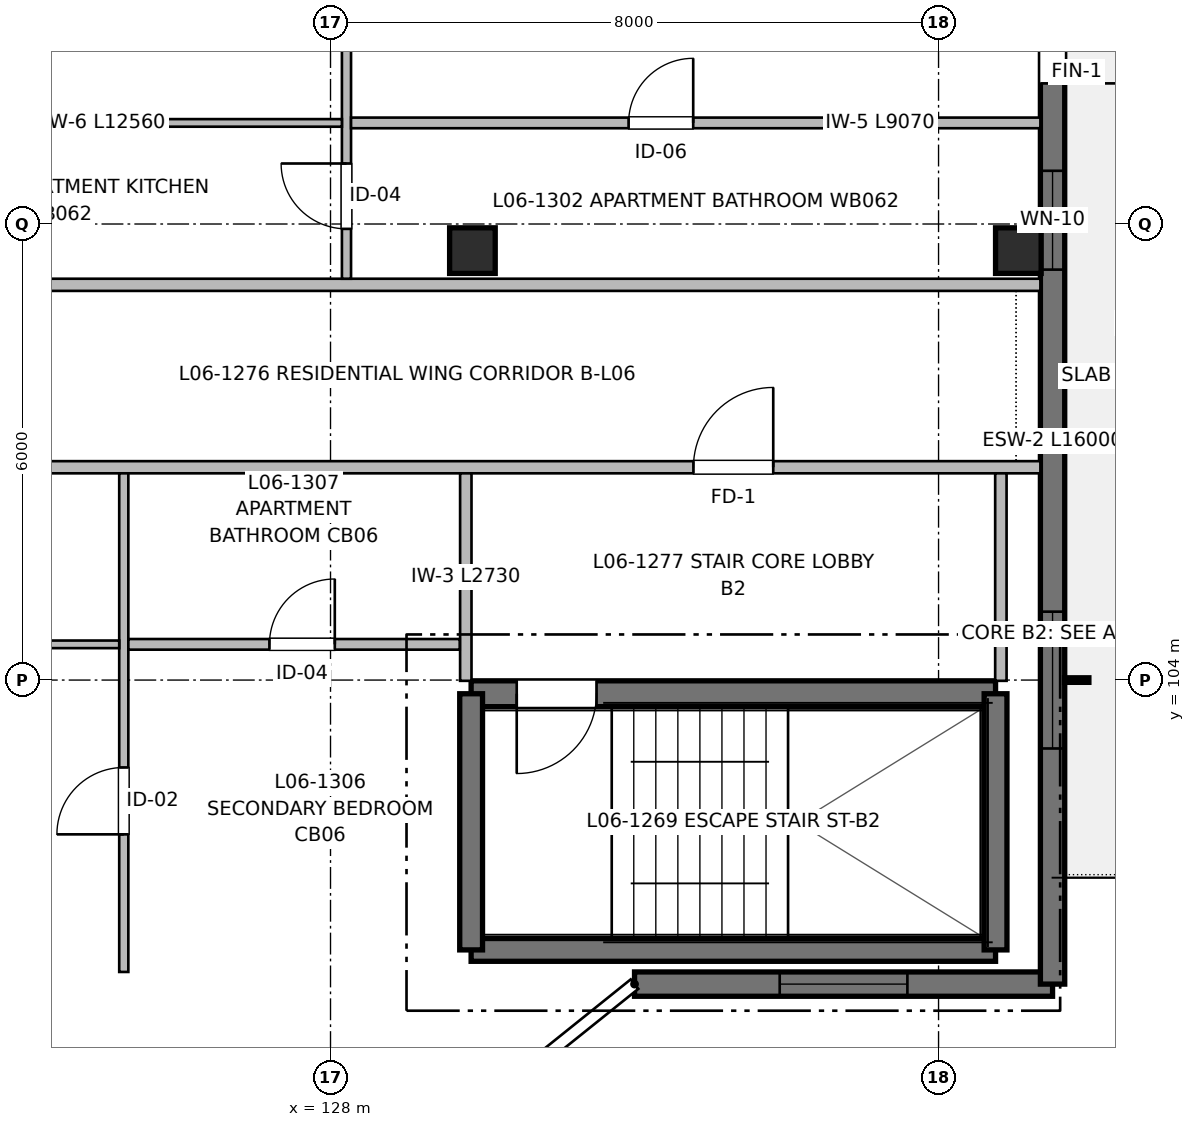
"""IFC4 building model, lengths in metres.
Left out: names, types, materials, properties, quantities, classifications, styles, units other than length and angle.
Written with IfcOpenShell. Run it as: python <this file> out.ifc"""

import sys

from ifc_helpers import new_model, si_unit, direction, frame, frame_2d, origin, origin_2d, place, context, subcontext, project, spatial, rectangle, extrude, element, fill, save


model = new_model("IFC4")
c1 = context("Model", 3, precision=1e-05, world=origin(), true_north=direction((0.0, 1.0)))
c2 = subcontext(c1, "Body", "Model", "MODEL_VIEW")
j1 = project(units=[si_unit("LENGTHUNIT", "METRE"), si_unit("PLANEANGLEUNIT", "RADIAN")], contexts=[c1])
p1 = place(None, origin())
s1 = spatial("IfcSite", under=j1, at=p1, CompositionType="ELEMENT")
p2 = place(p1, origin())
s2 = spatial("IfcBuilding", under=s1, at=p2, CompositionType="ELEMENT")
p3 = place(p2, frame((0.0, 0.0, 20.16)))
s3 = spatial("IfcBuildingStorey", under=s2, at=p3, CompositionType="ELEMENT", Elevation=20.16)
for number, where, z_axis, x_axis in (
    (1, (129.867, 109.65, 0.0), (0.0, 0.0, 1.0), (1.0, 0.0, 0.0)),
    (2, (137.05, 109.65, 0.0), (0.0, 0.0, 1.0), (1.0, 0.0, 0.0)),
):
    element("IfcColumn", number, at=place(p3, frame(where, z_axis=z_axis, x_axis=x_axis)), inside=s3, PredefinedType="COLUMN", context=c2, shape_type="SweptSolid", body=[
        extrude(rectangle(XDim=0.6, YDim=0.6, at=origin_2d()), origin(), (0.0, 0.0, 1.0), 3.2),
    ])
p4 = place(p3, frame((129.85, 100.45, 0.0), z_axis=(0.0, 0.0, 1.0), x_axis=(1.0, 0.0, 0.0)))
e3 = element("IfcWall", 3, at=p4, inside=s3, PredefinedType="SHEAR", context=c2, shape_type="SweptSolid", body=[
    extrude(rectangle(XDim=6.9, YDim=0.3, at=frame_2d((3.45, 0.0))), origin(), (0.0, 0.0, 1.0), 3.2),
])
p5 = place(p3, frame((136.75, 103.82, 0.0), z_axis=(0.0, 0.0, 1.0), x_axis=(-1.0, 0.0, 0.0)))
e4 = element("IfcWall", 4, at=p5, inside=s3, PredefinedType="SHEAR", context=c2, shape_type="SweptSolid", body=[
    extrude(rectangle(XDim=6.9, YDim=0.34, at=frame_2d((3.45, 0.0))), origin(), (0.0, 0.0, 1.0), 3.2),
])
p6 = place(p5, frame((5.25, 0.0, 0.0)))
e5 = element("IfcOpeningElement", 5, at=p6, cuts=e4, PredefinedType="OPENING", context=c2, shape_type="SweptSolid", body=[
    extrude(rectangle(XDim=1.05, YDim=2.15, at=frame_2d((0.525, 1.075))), frame((0.0, 0.18, 0.0), z_axis=(0.0, -1.0, 0.0), x_axis=(1.0, 0.0, 0.0)), (0.0, 0.0, 1.0), 0.36),
])
for number, where, z_axis, x_axis in (
    (6, (129.85, 103.82, 0.0), (0.0, 0.0, 1.0), (0.0, -1.0, 0.0)),
    (7, (136.75, 100.45, 0.0), (0.0, 0.0, 1.0), (0.0, 1.0, 0.0)),
):
    element("IfcWall", number, at=place(p3, frame(where, z_axis=z_axis, x_axis=x_axis)), inside=s3, PredefinedType="SHEAR", context=c2, shape_type="SweptSolid", body=[
        extrude(rectangle(XDim=3.37, YDim=0.3, at=frame_2d((1.685, 0.0))), origin(), (0.0, 0.0, 1.0), 3.2),
    ])
p7 = place(p3, frame((137.5, 100.0, 0.0), z_axis=(0.0, 0.0, 1.0), x_axis=(-1.0, 0.0, 0.0)))
e8 = element("IfcWall", 8, at=p7, inside=s3, PredefinedType="SHEAR", context=c2, shape_type="SweptSolid", body=[
    extrude(rectangle(XDim=5.5, YDim=0.32, at=frame_2d((2.75, 0.0))), origin(), (0.0, 0.0, 1.0), 2.98),
])
p8 = place(p7, frame((1.91, 0.0, 0.72)))
e9 = element("IfcOpeningElement", 9, at=p8, cuts=e8, PredefinedType="OPENING", context=c2, shape_type="SweptSolid", body=[
    extrude(rectangle(XDim=1.68, YDim=1.5, at=frame_2d((0.84, 0.75))), frame((0.0, 0.17, 0.0), z_axis=(0.0, -1.0, 0.0), x_axis=(1.0, 0.0, 0.0)), (0.0, 0.0, 1.0), 0.34),
])
p9 = place(p3, frame((137.5, 116.0, 0.0), z_axis=(0.0, 0.0, 1.0), x_axis=(0.0, -1.0, 0.0)))
e10 = element("IfcWall", 10, at=p9, inside=s3, PredefinedType="SHEAR", context=c2, shape_type="SweptSolid", body=[
    extrude(rectangle(XDim=16.0, YDim=0.32, at=frame_2d((8.0, 0.0))), origin(), (0.0, 0.0, 1.0), 2.98),
])
p10 = place(p9, frame((2.95, 0.0, 0.0)))
e11 = element("IfcOpeningElement", 11, at=p10, cuts=e10, PredefinedType="OPENING", context=c2, shape_type="SweptSolid", body=[
    extrude(rectangle(XDim=1.2, YDim=2.2, at=frame_2d((0.6, 1.1))), frame((0.0, 0.17, 0.0), z_axis=(0.0, -1.0, 0.0), x_axis=(1.0, 0.0, 0.0)), (0.0, 0.0, 1.0), 0.34),
])
p11 = place(p9, frame((5.3, 0.0, 0.82)))
e12 = element("IfcOpeningElement", 12, at=p11, cuts=e10, PredefinedType="OPENING", context=c2, shape_type="SweptSolid", body=[
    extrude(rectangle(XDim=1.3, YDim=1.4, at=frame_2d((0.65, 0.7))), frame((0.0, 0.17, 0.0), z_axis=(0.0, -1.0, 0.0), x_axis=(1.0, 0.0, 0.0)), (0.0, 0.0, 1.0), 0.34),
])
p12 = place(p9, frame((11.1, 0.0, 0.72)))
e13 = element("IfcOpeningElement", 13, at=p12, cuts=e10, PredefinedType="OPENING", context=c2, shape_type="SweptSolid", body=[
    extrude(rectangle(XDim=1.8, YDim=1.5, at=frame_2d((0.9, 0.75))), frame((0.0, 0.17, 0.0), z_axis=(0.0, -1.0, 0.0), x_axis=(1.0, 0.0, 0.0)), (0.0, 0.0, 1.0), 0.34),
])
p13 = place(p3, frame((113.2, 106.8, 0.0), z_axis=(0.0, 0.0, 1.0), x_axis=(1.0, 0.0, 0.0)))
e14 = element("IfcWall", 14, at=p13, inside=s3, PredefinedType="PARTITIONING", context=c2, shape_type="SweptSolid", body=[
    extrude(rectangle(XDim=24.14, YDim=0.16, at=frame_2d((12.07, 0.0))), origin(), (0.0, 0.0, 1.0), 2.935),
])
p14 = place(p13, frame((19.575, 0.0, 0.0)))
e15 = element("IfcOpeningElement", 15, at=p14, cuts=e14, PredefinedType="OPENING", context=c2, shape_type="SweptSolid", body=[
    extrude(rectangle(XDim=1.05, YDim=2.15, at=frame_2d((0.525, 1.075))), frame((0.0, 0.09, 0.0), z_axis=(0.0, -1.0, 0.0), x_axis=(1.0, 0.0, 0.0)), (0.0, 0.0, 1.0), 0.18),
])
p15 = place(p13, frame((8.995, 0.0, 0.0)))
e16 = element("IfcOpeningElement", 16, at=p15, cuts=e14, PredefinedType="OPENING", context=c2, shape_type="SweptSolid", body=[
    extrude(rectangle(XDim=0.98, YDim=2.15, at=frame_2d((0.49, 1.075))), frame((0.0, 0.09, 0.0), z_axis=(0.0, -1.0, 0.0), x_axis=(1.0, 0.0, 0.0)), (0.0, 0.0, 1.0), 0.18),
])
p16 = place(p3, frame((93.66, 109.2, 0.0), z_axis=(0.0, 0.0, 1.0), x_axis=(1.0, 0.0, 0.0)))
e17 = element("IfcWall", 17, at=p16, inside=s3, PredefinedType="PARTITIONING", context=c2, shape_type="SweptSolid", body=[
    extrude(rectangle(XDim=43.68, YDim=0.16, at=frame_2d((21.84, 0.0))), origin(), (0.0, 0.0, 1.0), 2.935),
])
p17 = place(p16, frame((5.815, 0.0, 0.0)))
e18 = element("IfcOpeningElement", 18, at=p17, cuts=e17, PredefinedType="OPENING", context=c2, shape_type="SweptSolid", body=[
    extrude(rectangle(XDim=0.98, YDim=2.15, at=frame_2d((0.49, 1.075))), frame((0.0, 0.09, 0.0), z_axis=(0.0, -1.0, 0.0), x_axis=(1.0, 0.0, 0.0)), (0.0, 0.0, 1.0), 0.18),
])
p18 = place(p16, frame((27.35, 0.0, 0.0)))
e19 = element("IfcOpeningElement", 19, at=p18, cuts=e17, PredefinedType="OPENING", context=c2, shape_type="SweptSolid", body=[
    extrude(rectangle(XDim=0.98, YDim=2.15, at=frame_2d((0.49, 1.075))), frame((0.0, 0.09, 0.0), z_axis=(0.0, -1.0, 0.0), x_axis=(1.0, 0.0, 0.0)), (0.0, 0.0, 1.0), 0.18),
])
for number, where, z_axis, x_axis in (
    (20, (129.78, 103.99, 0.0), (0.0, 0.0, 1.0), (0.0, 1.0, 0.0)),
    (21, (136.82, 103.99, 0.0), (0.0, 0.0, 1.0), (0.0, 1.0, 0.0)),
):
    element("IfcWall", number, at=place(p3, frame(where, z_axis=z_axis, x_axis=x_axis)), inside=s3, PredefinedType="PARTITIONING", context=c2, shape_type="SweptSolid", body=[
        extrude(rectangle(XDim=2.73, YDim=0.15, at=frame_2d((1.365, 0.0))), origin(), (0.0, 0.0, 1.0), 2.935),
    ])
p19 = place(p3, frame((128.21, 109.28, 0.0), z_axis=(0.0, 0.0, 1.0), x_axis=(0.0, 1.0, 0.0)))
e22 = element("IfcWall", 22, at=p19, inside=s3, PredefinedType="PARTITIONING", context=c2, shape_type="SweptSolid", body=[
    extrude(rectangle(XDim=6.59, YDim=0.12, at=frame_2d((3.295, 0.0))), origin(), (0.0, 0.0, 1.0), 2.935),
])
p20 = place(p19, frame((0.656, 0.0, 0.0)))
e23 = element("IfcOpeningElement", 23, at=p20, cuts=e22, PredefinedType="OPENING", context=c2, shape_type="SweptSolid", body=[
    extrude(rectangle(XDim=0.86, YDim=2.1, at=frame_2d((0.43, 1.05))), frame((0.0, 0.07, 0.0), z_axis=(0.0, -1.0, 0.0), x_axis=(1.0, 0.0, 0.0)), (0.0, 0.0, 1.0), 0.14),
])
p21 = place(p19, frame((4.093, 0.0, 0.0)))
e24 = element("IfcOpeningElement", 24, at=p21, cuts=e22, PredefinedType="OPENING", context=c2, shape_type="SweptSolid", body=[
    extrude(rectangle(XDim=0.9, YDim=2.1, at=frame_2d((0.45, 1.05))), frame((0.0, 0.07, 0.0), z_axis=(0.0, -1.0, 0.0), x_axis=(1.0, 0.0, 0.0)), (0.0, 0.0, 1.0), 0.14),
])
p22 = place(p3, frame((128.27, 111.33, 0.0), z_axis=(0.0, 0.0, 1.0), x_axis=(1.0, 0.0, 0.0)))
e25 = element("IfcWall", 25, at=p22, inside=s3, PredefinedType="PARTITIONING", context=c2, shape_type="SweptSolid", body=[
    extrude(rectangle(XDim=9.07, YDim=0.14, at=frame_2d((4.535, 0.0))), origin(), (0.0, 0.0, 1.0), 2.935),
])
p23 = place(p22, frame((3.652, 0.0, 0.0)))
e26 = element("IfcOpeningElement", 26, at=p23, cuts=e25, PredefinedType="OPENING", context=c2, shape_type="SweptSolid", body=[
    extrude(rectangle(XDim=0.85, YDim=2.05, at=frame_2d((0.425, 1.025))), frame((0.0, 0.08, 0.0), z_axis=(0.0, -1.0, 0.0), x_axis=(1.0, 0.0, 0.0)), (0.0, 0.0, 1.0), 0.16),
])
p24 = place(p3, frame((115.59, 111.33, 0.0), z_axis=(0.0, 0.0, 1.0), x_axis=(1.0, 0.0, 0.0)))
e27 = element("IfcWall", 27, at=p24, inside=s3, PredefinedType="PARTITIONING", context=c2, shape_type="SweptSolid", body=[
    extrude(rectangle(XDim=12.56, YDim=0.1, at=frame_2d((6.28, 0.0))), origin(), (0.0, 0.0, 1.0), 2.935),
])
p25 = place(p24, frame((5.048, 0.0, 0.0)))
e28 = element("IfcOpeningElement", 28, at=p25, cuts=e27, PredefinedType="OPENING", context=c2, shape_type="SweptSolid", body=[
    extrude(rectangle(XDim=0.92, YDim=2.1, at=frame_2d((0.46, 1.05))), frame((0.0, 0.06, 0.0), z_axis=(0.0, -1.0, 0.0), x_axis=(1.0, 0.0, 0.0)), (0.0, 0.0, 1.0), 0.12),
])
p26 = place(p3, frame((125.28, 100.16, 0.0), z_axis=(0.0, 0.0, 1.0), x_axis=(0.0, 1.0, 0.0)))
e29 = element("IfcWall", 29, at=p26, inside=s3, PredefinedType="PARTITIONING", context=c2, shape_type="SweptSolid", body=[
    extrude(rectangle(XDim=6.56, YDim=0.12, at=frame_2d((3.28, 0.0))), origin(), (0.0, 0.0, 1.0), 2.935),
])
p27 = place(p26, frame((1.81, 0.0, 0.0)))
e30 = element("IfcOpeningElement", 30, at=p27, cuts=e29, PredefinedType="OPENING", context=c2, shape_type="SweptSolid", body=[
    extrude(rectangle(XDim=0.88, YDim=2.1, at=frame_2d((0.44, 1.05))), frame((0.0, 0.07, 0.0), z_axis=(0.0, -1.0, 0.0), x_axis=(1.0, 0.0, 0.0)), (0.0, 0.0, 1.0), 0.14),
])
p28 = place(p3, frame((125.34, 104.47, 0.0), z_axis=(0.0, 0.0, 1.0), x_axis=(1.0, 0.0, 0.0)))
e31 = element("IfcWall", 31, at=p28, inside=s3, PredefinedType="PARTITIONING", context=c2, shape_type="SweptSolid", body=[
    extrude(rectangle(XDim=4.36, YDim=0.14, at=frame_2d((2.18, 0.0))), origin(), (0.0, 0.0, 1.0), 2.935),
])
p29 = place(p28, frame((1.856, 0.0, 0.0)))
e32 = element("IfcOpeningElement", 32, at=p29, cuts=e31, PredefinedType="OPENING", context=c2, shape_type="SweptSolid", body=[
    extrude(rectangle(XDim=0.86, YDim=2.1, at=frame_2d((0.43, 1.05))), frame((0.0, 0.08, 0.0), z_axis=(0.0, -1.0, 0.0), x_axis=(1.0, 0.0, 0.0)), (0.0, 0.0, 1.0), 0.16),
])
p30 = place(p3, frame((120.09, 104.47, 0.0), z_axis=(0.0, 0.0, 1.0), x_axis=(1.0, 0.0, 0.0)))
e33 = element("IfcWall", 33, at=p30, inside=s3, PredefinedType="PARTITIONING", context=c2, shape_type="SweptSolid", body=[
    extrude(rectangle(XDim=5.13, YDim=0.1, at=frame_2d((2.565, 0.0))), origin(), (0.0, 0.0, 1.0), 2.935),
])
p31 = place(p30, frame((2.18, 0.0, 0.0)))
e34 = element("IfcOpeningElement", 34, at=p31, cuts=e33, PredefinedType="OPENING", context=c2, shape_type="SweptSolid", body=[
    extrude(rectangle(XDim=0.92, YDim=2.1, at=frame_2d((0.46, 1.05))), frame((0.0, 0.06, 0.0), z_axis=(0.0, -1.0, 0.0), x_axis=(1.0, 0.0, 0.0)), (0.0, 0.0, 1.0), 0.12),
])
p32 = place(p6, origin())
e35 = element("IfcDoor", 35, at=p32, inside=s3, OperationType="SINGLE_SWING_RIGHT", PredefinedType="DOOR", context=c2, shape_type="SweptSolid", body=[
    extrude(rectangle(XDim=1.05, YDim=2.15, at=frame_2d((0.525, 1.075))), frame((0.0, 0.025, 0.0), z_axis=(0.0, -1.0, 0.0), x_axis=(1.0, 0.0, 0.0)), (0.0, 0.0, 1.0), 0.05),
])
fill(e5, e35)
p33 = place(p8, origin())
e36 = element("IfcWindow", 36, at=p33, inside=s3, PartitioningType="SINGLE_PANEL", PredefinedType="WINDOW", context=c2, shape_type="SweptSolid", body=[
    extrude(rectangle(XDim=1.68, YDim=1.5, at=frame_2d((0.84, 0.75))), frame((0.0, 0.03, 0.0), z_axis=(0.0, -1.0, 0.0), x_axis=(1.0, 0.0, 0.0)), (0.0, 0.0, 1.0), 0.06),
])
fill(e9, e36)
p34 = place(p10, origin())
e37 = element("IfcDoor", 37, at=p34, inside=s3, OperationType="SINGLE_SWING_RIGHT", PredefinedType="DOOR", context=c2, shape_type="SweptSolid", body=[
    extrude(rectangle(XDim=1.2, YDim=2.2, at=frame_2d((0.6, 1.1))), frame((0.0, 0.025, 0.0), z_axis=(0.0, -1.0, 0.0), x_axis=(1.0, 0.0, 0.0)), (0.0, 0.0, 1.0), 0.05),
])
fill(e11, e37)
p35 = place(p11, origin())
e38 = element("IfcWindow", 38, at=p35, inside=s3, PartitioningType="SINGLE_PANEL", PredefinedType="WINDOW", context=c2, shape_type="SweptSolid", body=[
    extrude(rectangle(XDim=1.3, YDim=1.4, at=frame_2d((0.65, 0.7))), frame((0.0, 0.03, 0.0), z_axis=(0.0, -1.0, 0.0), x_axis=(1.0, 0.0, 0.0)), (0.0, 0.0, 1.0), 0.06),
])
fill(e12, e38)
p36 = place(p12, origin())
e39 = element("IfcWindow", 39, at=p36, inside=s3, PartitioningType="SINGLE_PANEL", PredefinedType="WINDOW", context=c2, shape_type="SweptSolid", body=[
    extrude(rectangle(XDim=1.8, YDim=1.5, at=frame_2d((0.9, 0.75))), frame((0.0, 0.03, 0.0), z_axis=(0.0, -1.0, 0.0), x_axis=(1.0, 0.0, 0.0)), (0.0, 0.0, 1.0), 0.06),
])
fill(e13, e39)
p37 = place(p14, origin())
e40 = element("IfcDoor", 40, at=p37, inside=s3, OperationType="SINGLE_SWING_RIGHT", PredefinedType="DOOR", context=c2, shape_type="SweptSolid", body=[
    extrude(rectangle(XDim=1.05, YDim=2.15, at=frame_2d((0.525, 1.075))), frame((0.0, 0.025, 0.0), z_axis=(0.0, -1.0, 0.0), x_axis=(1.0, 0.0, 0.0)), (0.0, 0.0, 1.0), 0.05),
])
fill(e15, e40)
p38 = place(p20, origin())
e41 = element("IfcDoor", 41, at=p38, inside=s3, OperationType="SINGLE_SWING_RIGHT", PredefinedType="DOOR", context=c2, shape_type="SweptSolid", body=[
    extrude(rectangle(XDim=0.86, YDim=2.1, at=frame_2d((0.43, 1.05))), frame((0.0, 0.025, 0.0), z_axis=(0.0, -1.0, 0.0), x_axis=(1.0, 0.0, 0.0)), (0.0, 0.0, 1.0), 0.05),
])
fill(e23, e41)
p39 = place(p23, origin())
e42 = element("IfcDoor", 42, at=p39, inside=s3, OperationType="SINGLE_SWING_RIGHT", PredefinedType="DOOR", context=c2, shape_type="SweptSolid", body=[
    extrude(rectangle(XDim=0.85, YDim=2.05, at=frame_2d((0.425, 1.025))), frame((0.0, 0.025, 0.0), z_axis=(0.0, -1.0, 0.0), x_axis=(1.0, 0.0, 0.0)), (0.0, 0.0, 1.0), 0.05),
])
fill(e26, e42)
p40 = place(p27, origin())
e43 = element("IfcDoor", 43, at=p40, inside=s3, OperationType="SINGLE_SWING_LEFT", PredefinedType="DOOR", context=c2, shape_type="SweptSolid", body=[
    extrude(rectangle(XDim=0.88, YDim=2.1, at=frame_2d((0.44, 1.05))), frame((0.0, 0.025, 0.0), z_axis=(0.0, -1.0, 0.0), x_axis=(1.0, 0.0, 0.0)), (0.0, 0.0, 1.0), 0.05),
])
fill(e30, e43)
p41 = place(p29, origin())
e44 = element("IfcDoor", 44, at=p41, inside=s3, OperationType="SINGLE_SWING_RIGHT", PredefinedType="DOOR", context=c2, shape_type="SweptSolid", body=[
    extrude(rectangle(XDim=0.86, YDim=2.1, at=frame_2d((0.43, 1.05))), frame((0.0, 0.025, 0.0), z_axis=(0.0, -1.0, 0.0), x_axis=(1.0, 0.0, 0.0)), (0.0, 0.0, 1.0), 0.05),
])
fill(e32, e44)
save(model, sys.argv[1])
